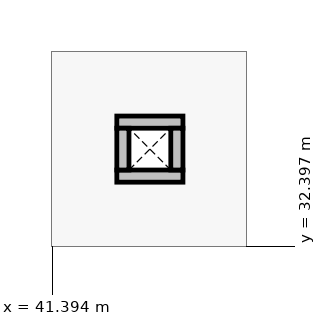
"""IFC4 building model, lengths in metres.
Left out: names, types, materials, properties, quantities, classifications, styles, units other than length and angle.
Written with IfcOpenShell. Run it as: python <this file> out.ifc"""

import sys

from ifc_helpers import new_model, si_unit, direction, frame, frame_2d, origin, place, context, subcontext, project, spatial, rectangle, extrude, element, save


model = new_model("IFC4")
c1 = context("Model", 3, precision=1e-05, world=origin(), true_north=direction((0.0, 1.0)))
c2 = subcontext(c1, "Body", "Model", "MODEL_VIEW")
j1 = project(units=[si_unit("LENGTHUNIT", "METRE"), si_unit("PLANEANGLEUNIT", "RADIAN")], contexts=[c1])
p1 = place(None, origin())
s1 = spatial("IfcSite", under=j1, at=p1, CompositionType="ELEMENT")
p2 = place(p1, origin())
s2 = spatial("IfcBuilding", under=s1, at=p2, CompositionType="ELEMENT")
p3 = place(p2, frame((0.0, 0.0, 4.8)))
s3 = spatial("IfcBuildingStorey", under=s2, at=p3, CompositionType="ELEMENT", Elevation=4.8)
for number, where, z_axis, x_axis in (
    (1, (42.24, 33.32, 0.0), (0.0, 0.0, 1.0), (1.0, 0.0, 0.0)),
    (2, (42.24, 34.03, 0.0), (0.0, 0.0, 1.0), (1.0, 0.0, 0.0)),
):
    element("IfcWall", number, at=place(p3, frame(where, z_axis=z_axis, x_axis=x_axis)), inside=s3, PredefinedType="PARTITIONING", context=c2, shape_type="SweptSolid", body=[
        extrude(rectangle(XDim=0.87, YDim=0.16, at=frame_2d((0.435, 0.0))), origin(), (0.0, 0.0, 1.0), 3.35),
    ])
for number, where, z_axis, x_axis in (
    (3, (42.32, 33.4, 0.0), (0.0, 0.0, 1.0), (0.0, 1.0, 0.0)),
    (4, (43.03, 33.4, 0.0), (0.0, 0.0, 1.0), (0.0, 1.0, 0.0)),
):
    element("IfcWall", number, at=place(p3, frame(where, z_axis=z_axis, x_axis=x_axis)), inside=s3, PredefinedType="PARTITIONING", context=c2, shape_type="SweptSolid", body=[
        extrude(rectangle(XDim=0.55, YDim=0.16, at=frame_2d((0.275, 0.0))), origin(), (0.0, 0.0, 1.0), 3.35),
    ])
save(model, sys.argv[1])
